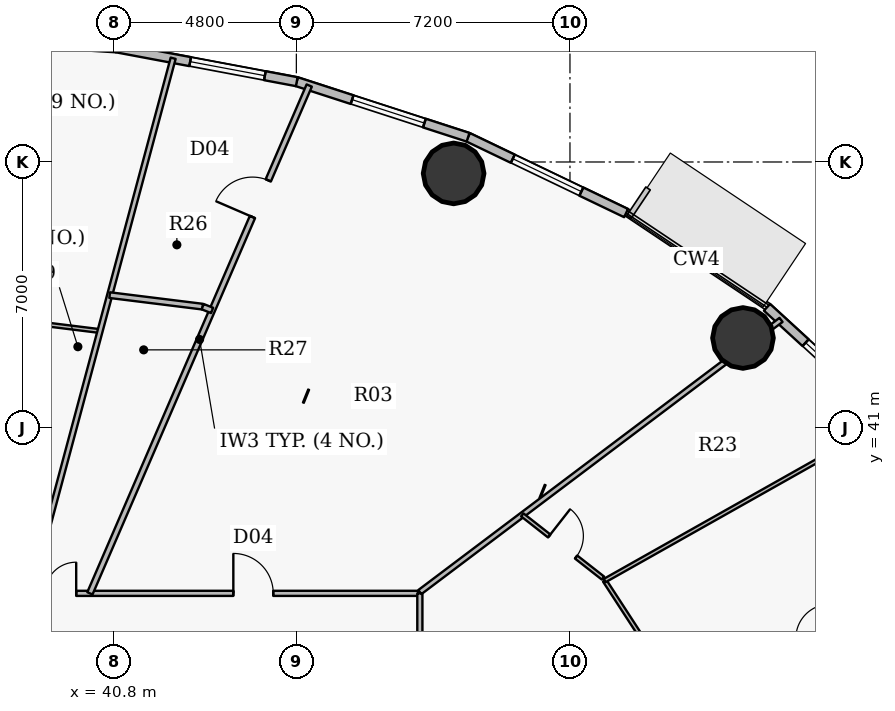
"""IFC4 building model, lengths in metres.
Left out: names, types, materials, properties, quantities, classifications, styles, units other than length and angle.
Written with IfcOpenShell. Run it as: python <this file> out.ifc"""

import sys

from ifc_helpers import new_model, si_unit, direction, frame, frame_2d, origin, origin_2d, place, context, subcontext, project, spatial, rectangle, hollow_circle, extrude, source, transform, mapped, element, fill, save


model = new_model("IFC4")
c1 = context("Model", 3, precision=1e-05, world=origin(), true_north=direction((0.0, 1.0)))
c2 = subcontext(c1, "Body", "Model", "MODEL_VIEW")
j1 = project(units=[si_unit("LENGTHUNIT", "METRE"), si_unit("PLANEANGLEUNIT", "RADIAN")], contexts=[c1])
p1 = place(None, origin())
s1 = spatial("IfcSite", under=j1, at=p1, CompositionType="ELEMENT")
p2 = place(p1, origin())
s2 = spatial("IfcBuilding", under=s1, at=p2, CompositionType="ELEMENT")
p3 = place(p2, frame((0.0, 0.0, 70.2)))
s3 = spatial("IfcBuildingStorey", under=s2, at=p3, CompositionType="ELEMENT", Elevation=70.2)
for number, where, z_axis, x_axis in (
    (1, (57.353, 43.369, 0.0), (0.0, 0.0, 1.0), (1.0, 0.0, 0.0)),
    (2, (49.738, 47.699, 0.0), (0.0, 0.0, 1.0), (1.0, 0.0, 0.0)),
):
    element("IfcColumn", number, at=place(p3, frame(where, z_axis=z_axis, x_axis=x_axis)), inside=s3, PredefinedType="COLUMN", context=c2, shape_type="SweptSolid", body=[
        extrude(hollow_circle(Radius=0.8, WallThickness=0.045, at=origin_2d()), origin(), (0.0, 0.0, 1.0), 4.2),
    ])
p4 = place(p3, frame((57.985, 44.176, 0.0), z_axis=(0.0, 0.0, 1.0), x_axis=(0.737116376281, -0.67576582321, 0.0)))
e3 = element("IfcWall", 3, at=p4, inside=s3, PredefinedType="SOLIDWALL", context=c2, shape_type="SweptSolid", body=[
    extrude(rectangle(XDim=4.294, YDim=0.24, at=frame_2d((2.147, 0.0))), origin(), (0.0, 0.0, 1.0), 3.95),
])
p5 = place(p4, frame((1.378, 0.0, 0.9)))
e4 = element("IfcOpeningElement", 4, at=p5, cuts=e3, PredefinedType="OPENING", context=c2, shape_type="SweptSolid", body=[
    extrude(rectangle(XDim=2.0, YDim=1.75, at=origin_2d()), frame((1.0, 0.13, 0.875), z_axis=(0.0, -1.0, 0.0), x_axis=(1.0, 0.0, 0.0)), (0.0, 0.0, 1.0), 0.26),
])
p6 = place(p3, frame((50.118, 48.651, 0.0), z_axis=(0.0, 0.0, 1.0), x_axis=(0.901601503137, -0.432567601123, 0.0)))
e5 = element("IfcWall", 5, at=p6, inside=s3, PredefinedType="SOLIDWALL", context=c2, shape_type="SweptSolid", body=[
    extrude(rectangle(XDim=4.613, YDim=0.24, at=frame_2d((2.306, 0.0))), origin(), (0.0, 0.0, 1.0), 3.95),
])
p7 = place(p6, frame((1.306, 0.0, 0.9)))
e6 = element("IfcOpeningElement", 6, at=p7, cuts=e5, PredefinedType="OPENING", context=c2, shape_type="SweptSolid", body=[
    extrude(rectangle(XDim=2.0, YDim=1.75, at=origin_2d()), frame((1.0, 0.13, 0.875), z_axis=(0.0, -1.0, 0.0), x_axis=(1.0, 0.0, 0.0)), (0.0, 0.0, 1.0), 0.26),
])
p8 = place(p3, frame((45.611, 50.113, 0.0), z_axis=(0.0, 0.0, 1.0), x_axis=(0.951207699013, -0.308551313946, 0.0)))
e7 = element("IfcWall", 7, at=p8, inside=s3, PredefinedType="SOLIDWALL", context=c2, shape_type="SweptSolid", body=[
    extrude(rectangle(XDim=4.739, YDim=0.24, at=frame_2d((2.369, 0.0))), origin(), (0.0, 0.0, 1.0), 3.95),
])
p9 = place(p8, frame((1.531, 0.0, 0.9)))
e8 = element("IfcOpeningElement", 8, at=p9, cuts=e7, PredefinedType="OPENING", context=c2, shape_type="SweptSolid", body=[
    extrude(rectangle(XDim=2.0, YDim=1.75, at=origin_2d()), frame((1.0, 0.13, 0.875), z_axis=(0.0, -1.0, 0.0), x_axis=(1.0, 0.0, 0.0)), (0.0, 0.0, 1.0), 0.26),
])
p10 = place(p3, frame((40.865, 51.005, 0.0), z_axis=(0.0, 0.0, 1.0), x_axis=(0.982791952378, -0.184715939598, 0.0)))
e9 = element("IfcWall", 9, at=p10, inside=s3, PredefinedType="SOLIDWALL", context=c2, shape_type="SweptSolid", body=[
    extrude(rectangle(XDim=4.828, YDim=0.24, at=frame_2d((2.414, 0.0))), origin(), (0.0, 0.0, 1.0), 3.95),
])
p11 = place(p10, frame((1.974, 0.0, 0.9)))
e10 = element("IfcOpeningElement", 10, at=p11, cuts=e9, PredefinedType="OPENING", context=c2, shape_type="SweptSolid", body=[
    extrude(rectangle(XDim=2.0, YDim=1.75, at=origin_2d()), frame((1.0, 0.13, 0.875), z_axis=(0.0, -1.0, 0.0), x_axis=(1.0, 0.0, 0.0)), (0.0, 0.0, 1.0), 0.26),
])
p12 = place(p3, frame((36.0, 51.305, 0.0), z_axis=(0.0, 0.0, 1.0), x_axis=(0.998106954071, -0.061502099433, 0.0)))
e11 = element("IfcWall", 11, at=p12, inside=s3, PredefinedType="SOLIDWALL", context=c2, shape_type="SweptSolid", body=[
    extrude(rectangle(XDim=4.875, YDim=0.24, at=frame_2d((2.438, 0.0))), origin(), (0.0, 0.0, 1.0), 3.95),
])
p13 = place(p12, frame((1.437, 0.0, 0.9)))
e12 = element("IfcOpeningElement", 12, at=p13, cuts=e11, PredefinedType="OPENING", context=c2, shape_type="SweptSolid", body=[
    extrude(rectangle(XDim=2.0, YDim=1.75, at=origin_2d()), frame((1.0, 0.13, 0.875), z_axis=(0.0, -1.0, 0.0), x_axis=(1.0, 0.0, 0.0)), (0.0, 0.0, 1.0), 0.26),
])
p14 = place(p3, frame((36.0, 44.101, 0.0), z_axis=(0.0, 0.0, 1.0), x_axis=(0.992395933878, -0.123086597249, 0.0)))
e13 = element("IfcWall", 13, at=p14, inside=s3, PredefinedType="PARTITIONING", context=c2, shape_type="SweptSolid", body=[
    extrude(rectangle(XDim=4.469, YDim=0.1, at=frame_2d((2.234, 0.0))), origin(), (0.0, 0.0, 1.0), 3.285),
])
p15 = place(p3, frame((38.586, 36.65, 0.0), z_axis=(0.0, 0.0, 1.0), x_axis=(1.0, 0.0, 0.0)))
e14 = element("IfcWall", 14, at=p15, inside=s3, PredefinedType="PARTITIONING", context=c2, shape_type="SweptSolid", body=[
    extrude(rectangle(XDim=10.22, YDim=0.135, at=frame_2d((5.11, 0.0))), origin(), (0.0, 0.0, 1.0), 3.285),
])
p16 = place(p15, frame((5.356, 0.0, 0.0)))
e15 = element("IfcOpeningElement", 15, at=p16, cuts=e14, PredefinedType="OPENING", context=c2, shape_type="SweptSolid", body=[
    extrude(rectangle(XDim=1.05, YDim=2.15, at=origin_2d()), frame((0.525, 0.078, 1.075), z_axis=(0.0, -1.0, 0.0), x_axis=(1.0, 0.0, 0.0)), (0.0, 0.0, 1.0), 0.155),
])
p17 = place(p15, frame((0.401, 0.0, 0.0)))
e16 = element("IfcOpeningElement", 16, at=p17, cuts=e14, PredefinedType="OPENING", context=c2, shape_type="SweptSolid", body=[
    extrude(rectangle(XDim=0.82, YDim=2.1, at=origin_2d()), frame((0.41, 0.078, 1.05), z_axis=(0.0, -1.0, 0.0), x_axis=(1.0, 0.0, 0.0)), (0.0, 0.0, 1.0), 0.155),
])
p18 = place(p3, frame((38.788, 37.404, 0.0), z_axis=(0.0, 0.0, 1.0), x_axis=(0.258823359021, 0.965924670368, 0.0)))
e17 = element("IfcWall", 17, at=p18, inside=s3, PredefinedType="PARTITIONING", context=c2, shape_type="SweptSolid", body=[
    extrude(rectangle(XDim=13.796, YDim=0.135, at=frame_2d((6.898, 0.0))), origin(), (0.0, 0.0, 1.0), 3.335),
])
p19 = place(p3, frame((40.168, 36.65, 0.0), z_axis=(0.0, 0.0, 1.0), x_axis=(0.396494814434, 0.918036961199, 0.0)))
e18 = element("IfcWall", 18, at=p19, inside=s3, PredefinedType="PARTITIONING", context=c2, shape_type="SweptSolid", body=[
    extrude(rectangle(XDim=14.555, YDim=0.15, at=frame_2d((7.277, 0.0))), origin(), (0.0, 0.0, 1.0), 3.335),
])
p20 = place(p19, frame((10.787, 0.0, 0.0)))
e19 = element("IfcOpeningElement", 19, at=p20, cuts=e18, PredefinedType="OPENING", context=c2, shape_type="SweptSolid", body=[
    extrude(rectangle(XDim=1.05, YDim=2.15, at=origin_2d()), frame((0.525, 0.085, 1.075), z_axis=(0.0, -1.0, 0.0), x_axis=(1.0, 0.0, 0.0)), (0.0, 0.0, 1.0), 0.17),
])
p21 = place(p3, frame((40.688, 44.497, 0.0), z_axis=(0.0, 0.0, 1.0), x_axis=(0.992393246318, -0.123108263989, 0.0)))
e20 = element("IfcWall", 20, at=p21, inside=s3, PredefinedType="PARTITIONING", context=c2, shape_type="SweptSolid", body=[
    extrude(rectangle(XDim=2.465, YDim=0.15, at=frame_2d((1.232, 0.0))), origin(), (0.0, 0.0, 1.0), 3.95),
])
p22 = place(p3, frame((43.135, 44.193, 0.0), z_axis=(0.0, 0.0, 1.0), x_axis=(0.928853768355, -0.370446591309, 0.0)))
e21 = element("IfcWall", 21, at=p22, inside=s3, PredefinedType="PARTITIONING", context=c2, shape_type="SweptSolid", body=[
    extrude(rectangle(XDim=0.268, YDim=0.15, at=frame_2d((0.134, 0.0))), origin(), (0.0, 0.0, 1.0), 3.95),
])
p23 = place(p3, frame((48.85, 27.538, 0.0), z_axis=(0.0, 0.0, 1.0), x_axis=(0.0, 1.0, 0.0)))
e22 = element("IfcWall", 22, at=p23, inside=s3, PredefinedType="PARTITIONING", context=c2, shape_type="SweptSolid", body=[
    extrude(rectangle(XDim=9.112, YDim=0.135, at=frame_2d((4.556, 0.0))), origin(), (0.0, 0.0, 1.0), 3.285),
])
p24 = place(p23, frame((4.056, 0.0, 0.0)))
e23 = element("IfcOpeningElement", 23, at=p24, cuts=e22, PredefinedType="OPENING", context=c2, shape_type="SweptSolid", body=[
    extrude(rectangle(XDim=1.0, YDim=2.15, at=origin_2d()), frame((0.5, 0.078, 1.075), z_axis=(0.0, -1.0, 0.0), x_axis=(1.0, 0.0, 0.0)), (0.0, 0.0, 1.0), 0.155),
])
p25 = place(p3, frame((48.85, 36.683, 0.0), z_axis=(0.0, 0.0, 1.0), x_axis=(0.798631551047, 0.601820276888, 0.0)))
e24 = element("IfcWall", 24, at=p25, inside=s3, PredefinedType="PARTITIONING", context=c2, shape_type="SweptSolid", body=[
    extrude(rectangle(XDim=11.9, YDim=0.135, at=frame_2d((5.95, 0.0))), origin(), (0.0, 0.0, 1.0), 3.285),
])
p26 = place(p3, frame((51.545, 38.714, 0.0), z_axis=(0.0, 0.0, 1.0), x_axis=(0.787378908715, -0.616469345637, 0.0)))
e25 = element("IfcWall", 25, at=p26, inside=s3, PredefinedType="PARTITIONING", context=c2, shape_type="SweptSolid", body=[
    extrude(rectangle(XDim=2.697, YDim=0.1, at=frame_2d((1.349, 0.0))), origin(), (0.0, 0.0, 1.0), 3.285),
])
p27 = place(p26, frame((0.898, 0.0, 0.0)))
e26 = element("IfcOpeningElement", 26, at=p27, cuts=e25, PredefinedType="OPENING", context=c2, shape_type="SweptSolid", body=[
    extrude(rectangle(XDim=0.9, YDim=2.1, at=origin_2d()), frame((0.45, 0.06, 1.05), z_axis=(0.0, -1.0, 0.0), x_axis=(1.0, 0.0, 0.0)), (0.0, 0.0, 1.0), 0.12),
])
p28 = place(p3, frame((53.712, 36.986, 0.0), z_axis=(0.0, 0.0, 1.0), x_axis=(0.545414193743, -0.838166664372, 0.0)))
e27 = element("IfcWall", 27, at=p28, inside=s3, PredefinedType="PARTITIONING", context=c2, shape_type="SweptSolid", body=[
    extrude(rectangle(XDim=3.526, YDim=0.1, at=frame_2d((1.763, 0.0))), origin(), (0.0, 0.0, 1.0), 3.95),
])
p29 = place(p3, frame((53.712, 36.986, 0.0), z_axis=(0.0, 0.0, 1.0), x_axis=(0.871096144904, 0.491112519016, 0.0)))
e28 = element("IfcWall", 28, at=p29, inside=s3, PredefinedType="PARTITIONING", context=c2, shape_type="SweptSolid", body=[
    extrude(rectangle(XDim=8.603, YDim=0.1, at=frame_2d((4.302, 0.0))), origin(), (0.0, 0.0, 1.0), 3.335),
])
p30 = place(p3, frame((55.635, 34.03, 0.0), z_axis=(0.0, 0.0, 1.0), x_axis=(0.941479076549, 0.337071429255, 0.0)))
e29 = element("IfcWall", 29, at=p30, inside=s3, PredefinedType="PARTITIONING", context=c2, shape_type="SweptSolid", body=[
    extrude(rectangle(XDim=9.089, YDim=0.1, at=frame_2d((4.544, 0.0))), origin(), (0.0, 0.0, 1.0), 3.335),
])
p31 = place(p30, frame((3.357, 0.0, 0.0)))
e30 = element("IfcOpeningElement", 30, at=p31, cuts=e29, PredefinedType="OPENING", context=c2, shape_type="SweptSolid", body=[
    extrude(rectangle(XDim=0.9, YDim=2.1, at=origin_2d()), frame((0.45, 0.06, 1.05), z_axis=(0.0, -1.0, 0.0), x_axis=(1.0, 0.0, 0.0)), (0.0, 0.0, 1.0), 0.12),
])
m1 = source(origin(), c2, "Body", "SweptSolid", [
    extrude(rectangle(XDim=2.0, YDim=1.75, at=origin_2d()), frame((1.0, 0.03, 0.875), z_axis=(0.0, -1.0, 0.0), x_axis=(1.0, 0.0, 0.0)), (0.0, 0.0, 1.0), 0.06),
])
p32 = place(p5, origin())
e31 = element("IfcWindow", 31, at=p32, inside=s3, PartitioningType="DOUBLE_PANEL_VERTICAL", PredefinedType="WINDOW", context=c2, shape_type="MappedRepresentation", body=[
    mapped(m1, transform((0.0, 0.0, 0.0), x_axis=(1.0, 0.0, 0.0), y_axis=(0.0, 1.0, 0.0), z_axis=(0.0, 0.0, 1.0), scale=1.0)),
])
fill(e4, e31)
p33 = place(p7, origin())
e32 = element("IfcWindow", 32, at=p33, inside=s3, PartitioningType="DOUBLE_PANEL_VERTICAL", PredefinedType="WINDOW", context=c2, shape_type="MappedRepresentation", body=[
    mapped(m1, transform((0.0, 0.0, 0.0), x_axis=(1.0, 0.0, 0.0), y_axis=(0.0, 1.0, 0.0), z_axis=(0.0, 0.0, 1.0), scale=1.0)),
])
fill(e6, e32)
p34 = place(p9, origin())
e33 = element("IfcWindow", 33, at=p34, inside=s3, PartitioningType="DOUBLE_PANEL_VERTICAL", PredefinedType="WINDOW", context=c2, shape_type="MappedRepresentation", body=[
    mapped(m1, transform((0.0, 0.0, 0.0), x_axis=(1.0, 0.0, 0.0), y_axis=(0.0, 1.0, 0.0), z_axis=(0.0, 0.0, 1.0), scale=1.0)),
])
fill(e8, e33)
p35 = place(p11, origin())
e34 = element("IfcWindow", 34, at=p35, inside=s3, PartitioningType="DOUBLE_PANEL_VERTICAL", PredefinedType="WINDOW", context=c2, shape_type="MappedRepresentation", body=[
    mapped(m1, transform((0.0, 0.0, 0.0), x_axis=(1.0, 0.0, 0.0), y_axis=(0.0, 1.0, 0.0), z_axis=(0.0, 0.0, 1.0), scale=1.0)),
])
fill(e10, e34)
m2 = source(origin(), c2, "Body", "SweptSolid", [
    extrude(rectangle(XDim=0.9, YDim=2.1, at=origin_2d()), frame((0.45, 0.025, 1.05), z_axis=(0.0, -1.0, 0.0), x_axis=(1.0, 0.0, 0.0)), (0.0, 0.0, 1.0), 0.05),
])
p36 = place(p27, origin())
e35 = element("IfcDoor", 35, at=p36, inside=s3, OperationType="SINGLE_SWING_LEFT", PredefinedType="DOOR", context=c2, shape_type="MappedRepresentation", body=[
    mapped(m2, transform((0.0, 0.0, 0.0), x_axis=(1.0, 0.0, 0.0), y_axis=(0.0, 1.0, 0.0), z_axis=(0.0, 0.0, 1.0), scale=1.0)),
])
fill(e26, e35)
m3 = source(origin(), c2, "Body", "SweptSolid", [
    extrude(rectangle(XDim=1.05, YDim=2.15, at=origin_2d()), frame((0.525, 0.025, 1.075), z_axis=(0.0, -1.0, 0.0), x_axis=(1.0, 0.0, 0.0)), (0.0, 0.0, 1.0), 0.05),
])
p37 = place(p16, origin())
e36 = element("IfcDoor", 36, at=p37, inside=s3, OperationType="SINGLE_SWING_LEFT", PredefinedType="DOOR", context=c2, shape_type="MappedRepresentation", body=[
    mapped(m3, transform((0.0, 0.0, 0.0), x_axis=(1.0, 0.0, 0.0), y_axis=(0.0, 1.0, 0.0), z_axis=(0.0, 0.0, 1.0), scale=1.0)),
])
fill(e15, e36)
m4 = source(origin(), c2, "Body", "SweptSolid", [
    extrude(rectangle(XDim=0.82, YDim=2.1, at=origin_2d()), frame((0.41, 0.025, 1.05), z_axis=(0.0, -1.0, 0.0), x_axis=(1.0, 0.0, 0.0)), (0.0, 0.0, 1.0), 0.05),
])
p38 = place(p17, origin())
e37 = element("IfcDoor", 37, at=p38, inside=s3, OperationType="SINGLE_SWING_RIGHT", PredefinedType="DOOR", context=c2, shape_type="MappedRepresentation", body=[
    mapped(m4, transform((0.0, 0.0, 0.0), x_axis=(1.0, 0.0, 0.0), y_axis=(0.0, 1.0, 0.0), z_axis=(0.0, 0.0, 1.0), scale=1.0)),
])
fill(e16, e37)
p39 = place(p20, origin())
e38 = element("IfcDoor", 38, at=p39, inside=s3, OperationType="SINGLE_SWING_LEFT", PredefinedType="DOOR", context=c2, shape_type="MappedRepresentation", body=[
    mapped(m3, transform((0.0, 0.0, 0.0), x_axis=(1.0, 0.0, 0.0), y_axis=(0.0, 1.0, 0.0), z_axis=(0.0, 0.0, 1.0), scale=1.0)),
])
fill(e19, e38)
save(model, sys.argv[1])
